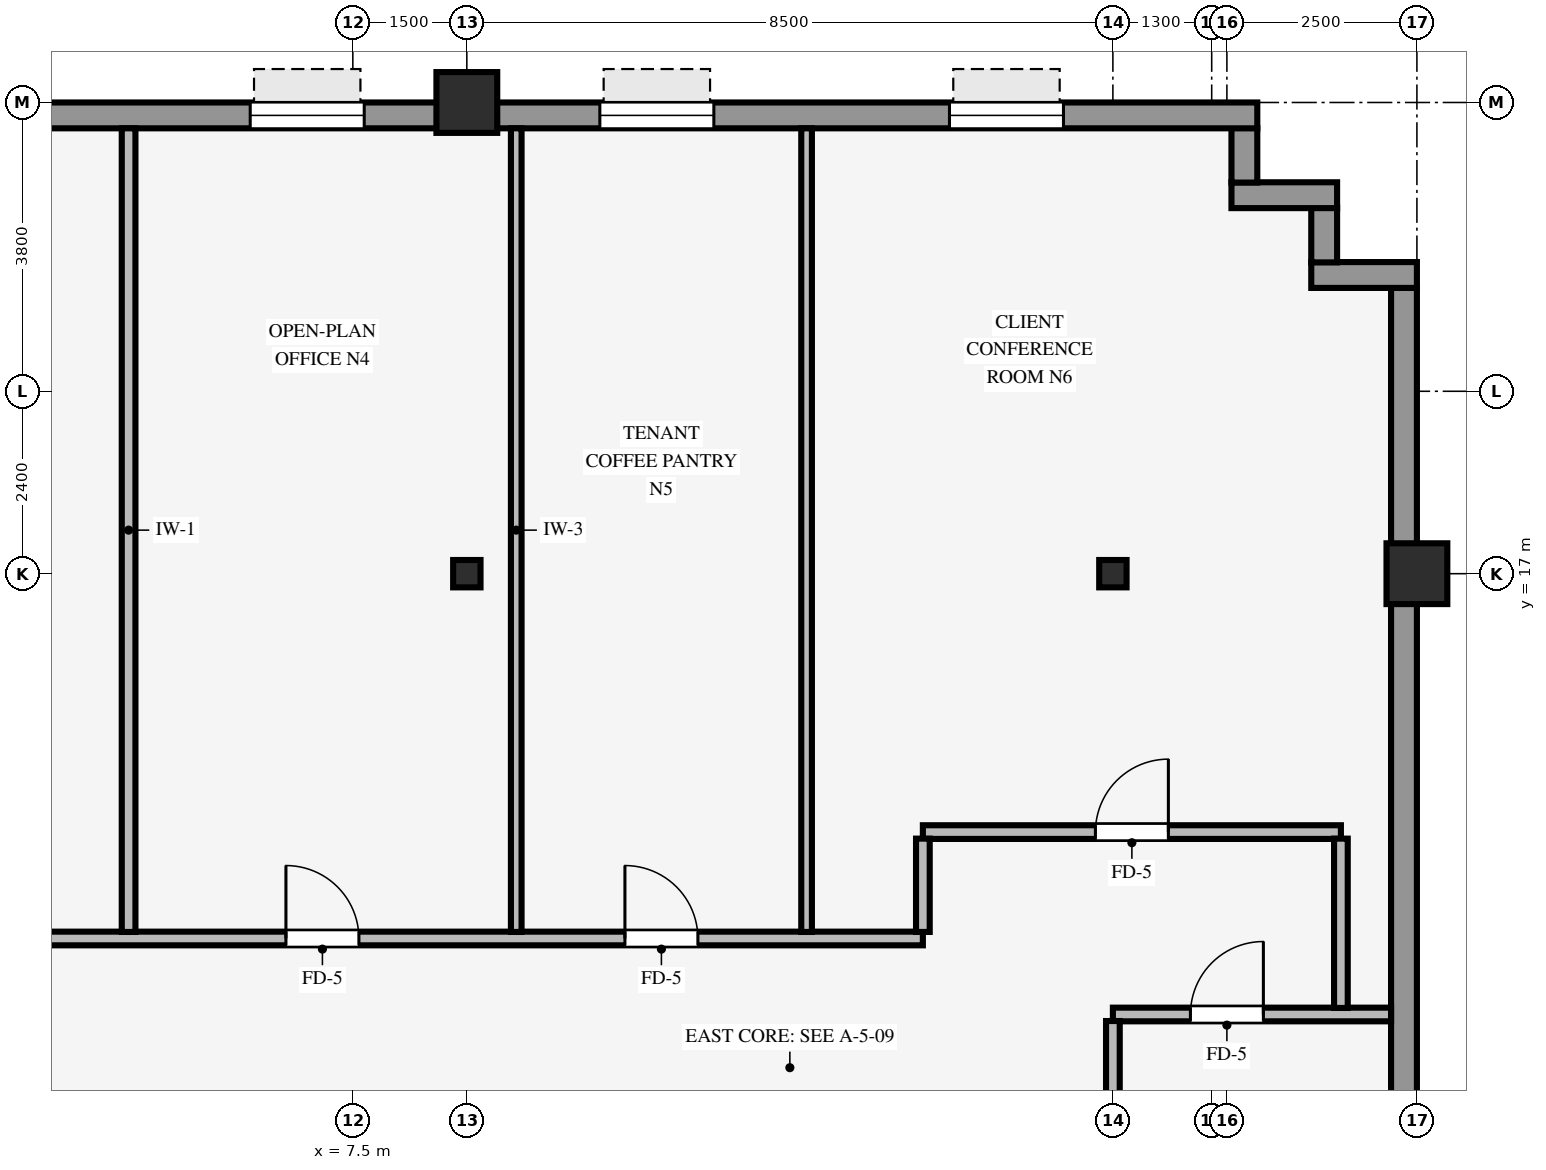
"""IFC4 building model, lengths in metres.
Left out: names, types, materials, properties, quantities, classifications, styles, units other than length and angle.
Written with IfcOpenShell. Run it as: python <this file> out.ifc"""

import sys

from ifc_helpers import new_model, si_unit, direction, frame, frame_2d, origin, origin_2d, place, context, subcontext, project, spatial, rectangle, hollow_rectangle, i_section, extrude, source, transform, mapped, element, fill, save


model = new_model("IFC4")
c1 = context("Model", 3, precision=1e-05, world=origin(), true_north=direction((0.0, 1.0)))
c2 = subcontext(c1, "Body", "Model", "MODEL_VIEW")
j1 = project(units=[si_unit("LENGTHUNIT", "METRE"), si_unit("PLANEANGLEUNIT", "RADIAN")], contexts=[c1])
p1 = place(None, origin())
s1 = spatial("IfcSite", under=j1, at=p1, CompositionType="ELEMENT")
p2 = place(p1, origin())
s2 = spatial("IfcBuilding", under=s1, at=p2, CompositionType="ELEMENT")
p3 = place(p2, frame((0.0, 0.0, 82.35)))
s3 = spatial("IfcBuildingStorey", under=s2, at=p3, CompositionType="ELEMENT", Elevation=82.35)
for number, where, z_axis, x_axis in (
    (1, (21.5, 17.0, 0.0), (0.0, 0.0, 1.0), (1.0, 0.0, 0.0)),
    (2, (9.0, 23.2, 0.0), (0.0, 0.0, 1.0), (1.0, 0.0, 0.0)),
):
    element("IfcColumn", number, at=place(p3, frame(where, z_axis=z_axis, x_axis=x_axis)), inside=s3, PredefinedType="COLUMN", context=c2, shape_type="SweptSolid", body=[
        extrude(hollow_rectangle(XDim=0.8, YDim=0.8, WallThickness=0.055, InnerFilletRadius=0.055, OuterFilletRadius=0.11, at=origin_2d()), origin(), (0.0, 0.0, 1.0), 3.25),
    ])
for number, where, z_axis, x_axis in (
    (3, (9.0, 17.0, 0.0), (0.0, 0.0, 1.0), (1.0, 0.0, 0.0)),
    (4, (17.5, 17.0, 0.0), (0.0, 0.0, 1.0), (1.0, 0.0, 0.0)),
):
    element("IfcColumn", number, at=place(p3, frame(where, z_axis=z_axis, x_axis=x_axis)), inside=s3, PredefinedType="COLUMN", context=c2, shape_type="SweptSolid", body=[
        extrude(i_section(OverallWidth=0.36, OverallDepth=0.36, WebThickness=0.021, FlangeThickness=0.021, FilletRadius=0.018, at=origin_2d()), origin(), (0.0, 0.0, 1.0), 3.25),
    ])
p4 = place(p3, frame((21.33, -20.764, 0.0), z_axis=(0.0, 0.0, 1.0), x_axis=(0.0, 1.0, 0.0)))
e5 = element("IfcWall", 5, at=p4, inside=s3, PredefinedType="STANDARD", context=c2, shape_type="SweptSolid", body=[
    extrude(rectangle(XDim=41.528, YDim=0.34, at=frame_2d((20.764, 0.0))), origin(), (0.0, 0.0, 1.0), 3.24),
])
p5 = place(p4, frame((15.793, 0.0, 0.8)))
e6 = element("IfcOpeningElement", 6, at=p5, cuts=e5, PredefinedType="OPENING", context=c2, shape_type="SweptSolid", body=[
    extrude(rectangle(XDim=2.3, YDim=1.62, at=frame_2d((1.15, 0.81))), frame((0.0, 0.18, 0.0), z_axis=(0.0, -1.0, 0.0), x_axis=(1.0, 0.0, 0.0)), (0.0, 0.0, 1.0), 0.36),
])
p6 = place(p4, frame((22.084, 0.0, 0.8)))
e7 = element("IfcOpeningElement", 7, at=p6, cuts=e5, PredefinedType="OPENING", context=c2, shape_type="SweptSolid", body=[
    extrude(rectangle(XDim=2.3, YDim=1.62, at=frame_2d((1.15, 0.81))), frame((0.0, 0.18, 0.0), z_axis=(0.0, -1.0, 0.0), x_axis=(1.0, 0.0, 0.0)), (0.0, 0.0, 1.0), 0.36),
])
p7 = place(p3, frame((20.11, 20.93, 0.0), z_axis=(0.0, 0.0, 1.0), x_axis=(1.0, 0.0, 0.0)))
e8 = element("IfcWall", 8, at=p7, inside=s3, PredefinedType="STANDARD", context=c2, shape_type="SweptSolid", body=[
    extrude(rectangle(XDim=1.39, YDim=0.34, at=frame_2d((0.695, 0.0))), origin(), (0.0, 0.0, 1.0), 3.24),
])
p8 = place(p3, frame((20.28, 21.096, 0.0), z_axis=(0.0, 0.0, 1.0), x_axis=(0.0, 1.0, 0.0)))
e9 = element("IfcWall", 9, at=p8, inside=s3, PredefinedType="STANDARD", context=c2, shape_type="SweptSolid", body=[
    extrude(rectangle(XDim=0.718, YDim=0.34, at=frame_2d((0.359, 0.0))), origin(), (0.0, 0.0, 1.0), 3.24),
])
p9 = place(p3, frame((19.06, 21.98, 0.0), z_axis=(0.0, 0.0, 1.0), x_axis=(1.0, 0.0, 0.0)))
e10 = element("IfcWall", 10, at=p9, inside=s3, PredefinedType="STANDARD", context=c2, shape_type="SweptSolid", body=[
    extrude(rectangle(XDim=1.39, YDim=0.34, at=frame_2d((0.695, 0.0))), origin(), (0.0, 0.0, 1.0), 3.24),
])
p10 = place(p3, frame((19.23, 22.146, 0.0), z_axis=(0.0, 0.0, 1.0), x_axis=(0.0, 1.0, 0.0)))
e11 = element("IfcWall", 11, at=p10, inside=s3, PredefinedType="STANDARD", context=c2, shape_type="SweptSolid", body=[
    extrude(rectangle(XDim=0.718, YDim=0.34, at=frame_2d((0.359, 0.0))), origin(), (0.0, 0.0, 1.0), 3.24),
])
p11 = place(p3, frame((-19.4, 23.03, 0.0), z_axis=(0.0, 0.0, 1.0), x_axis=(1.0, 0.0, 0.0)))
e12 = element("IfcWall", 12, at=p11, inside=s3, PredefinedType="STANDARD", context=c2, shape_type="SweptSolid", body=[
    extrude(rectangle(XDim=38.8, YDim=0.34, at=frame_2d((19.4, 0.0))), origin(), (0.0, 0.0, 1.0), 2.585),
])
p12 = place(p11, frame((2.55, 0.0, 0.8)))
e13 = element("IfcOpeningElement", 13, at=p12, cuts=e12, PredefinedType="OPENING", context=c2, shape_type="SweptSolid", body=[
    extrude(rectangle(XDim=1.5, YDim=1.6, at=frame_2d((0.75, 0.8))), frame((0.0, 0.18, 0.0), z_axis=(0.0, -1.0, 0.0), x_axis=(1.0, 0.0, 0.0)), (0.0, 0.0, 1.0), 0.36),
])
p13 = place(p11, frame((7.15, 0.0, 0.8)))
e14 = element("IfcOpeningElement", 14, at=p13, cuts=e12, PredefinedType="OPENING", context=c2, shape_type="SweptSolid", body=[
    extrude(rectangle(XDim=1.5, YDim=1.6, at=frame_2d((0.75, 0.8))), frame((0.0, 0.18, 0.0), z_axis=(0.0, -1.0, 0.0), x_axis=(1.0, 0.0, 0.0)), (0.0, 0.0, 1.0), 0.36),
])
p14 = place(p11, frame((12.2, 0.0, 0.8)))
e15 = element("IfcOpeningElement", 15, at=p14, cuts=e12, PredefinedType="OPENING", context=c2, shape_type="SweptSolid", body=[
    extrude(rectangle(XDim=1.5, YDim=1.6, at=frame_2d((0.75, 0.8))), frame((0.0, 0.18, 0.0), z_axis=(0.0, -1.0, 0.0), x_axis=(1.0, 0.0, 0.0)), (0.0, 0.0, 1.0), 0.36),
])
p15 = place(p11, frame((16.35, 0.0, 0.8)))
e16 = element("IfcOpeningElement", 16, at=p15, cuts=e12, PredefinedType="OPENING", context=c2, shape_type="SweptSolid", body=[
    extrude(rectangle(XDim=1.5, YDim=1.6, at=frame_2d((0.75, 0.8))), frame((0.0, 0.18, 0.0), z_axis=(0.0, -1.0, 0.0), x_axis=(1.0, 0.0, 0.0)), (0.0, 0.0, 1.0), 0.36),
])
p16 = place(p11, frame((20.95, 0.0, 0.8)))
e17 = element("IfcOpeningElement", 17, at=p16, cuts=e12, PredefinedType="OPENING", context=c2, shape_type="SweptSolid", body=[
    extrude(rectangle(XDim=1.5, YDim=1.6, at=frame_2d((0.75, 0.8))), frame((0.0, 0.18, 0.0), z_axis=(0.0, -1.0, 0.0), x_axis=(1.0, 0.0, 0.0)), (0.0, 0.0, 1.0), 0.36),
])
p17 = place(p11, frame((25.55, 0.0, 0.8)))
e18 = element("IfcOpeningElement", 18, at=p17, cuts=e12, PredefinedType="OPENING", context=c2, shape_type="SweptSolid", body=[
    extrude(rectangle(XDim=1.5, YDim=1.6, at=frame_2d((0.75, 0.8))), frame((0.0, 0.18, 0.0), z_axis=(0.0, -1.0, 0.0), x_axis=(1.0, 0.0, 0.0)), (0.0, 0.0, 1.0), 0.36),
])
p18 = place(p11, frame((30.15, 0.0, 0.8)))
e19 = element("IfcOpeningElement", 19, at=p18, cuts=e12, PredefinedType="OPENING", context=c2, shape_type="SweptSolid", body=[
    extrude(rectangle(XDim=1.5, YDim=1.6, at=frame_2d((0.75, 0.8))), frame((0.0, 0.18, 0.0), z_axis=(0.0, -1.0, 0.0), x_axis=(1.0, 0.0, 0.0)), (0.0, 0.0, 1.0), 0.36),
])
p19 = place(p11, frame((34.75, 0.0, 0.8)))
e20 = element("IfcOpeningElement", 20, at=p19, cuts=e12, PredefinedType="OPENING", context=c2, shape_type="SweptSolid", body=[
    extrude(rectangle(XDim=1.5, YDim=1.6, at=frame_2d((0.75, 0.8))), frame((0.0, 0.18, 0.0), z_axis=(0.0, -1.0, 0.0), x_axis=(1.0, 0.0, 0.0)), (0.0, 0.0, 1.0), 0.36),
])
p20 = place(p3, frame((17.5, 11.2, 0.0), z_axis=(0.0, 0.0, 1.0), x_axis=(1.0, 0.0, 0.0)))
e21 = element("IfcWall", 21, at=p20, inside=s3, PredefinedType="PARTITIONING", context=c2, shape_type="SweptSolid", body=[
    extrude(rectangle(XDim=3.66, YDim=0.18, at=frame_2d((1.83, 0.0))), origin(), (0.0, 0.0, 1.0), 3.24),
])
p21 = place(p20, frame((1.02, 0.0, 0.0)))
e22 = element("IfcOpeningElement", 22, at=p21, cuts=e21, PredefinedType="OPENING", context=c2, shape_type="SweptSolid", body=[
    extrude(rectangle(XDim=0.96, YDim=2.1, at=frame_2d((0.48, 1.05))), frame((0.0, 0.1, 0.0), z_axis=(0.0, -1.0, 0.0), x_axis=(1.0, 0.0, 0.0)), (0.0, 0.0, 1.0), 0.2),
])
p22 = place(p3, frame((-15.0, 12.2, 0.0), z_axis=(0.0, 0.0, 1.0), x_axis=(1.0, 0.0, 0.0)))
e23 = element("IfcWall", 23, at=p22, inside=s3, PredefinedType="PARTITIONING", context=c2, shape_type="SweptSolid", body=[
    extrude(rectangle(XDim=30.0, YDim=0.18, at=frame_2d((15.0, 0.0))), origin(), (0.0, 0.0, 1.0), 3.24),
])
p23 = place(p22, frame((3.1, 0.0, 0.0)))
e24 = element("IfcOpeningElement", 24, at=p23, cuts=e23, PredefinedType="OPENING", context=c2, shape_type="SweptSolid", body=[
    extrude(rectangle(XDim=0.96, YDim=2.1, at=frame_2d((0.48, 1.05))), frame((0.0, 0.1, 0.0), z_axis=(0.0, -1.0, 0.0), x_axis=(1.0, 0.0, 0.0)), (0.0, 0.0, 1.0), 0.2),
])
p24 = place(p22, frame((16.395, 0.0, 0.0)))
e25 = element("IfcOpeningElement", 25, at=p24, cuts=e23, PredefinedType="OPENING", context=c2, shape_type="SweptSolid", body=[
    extrude(rectangle(XDim=0.96, YDim=2.1, at=frame_2d((0.48, 1.05))), frame((0.0, 0.1, 0.0), z_axis=(0.0, -1.0, 0.0), x_axis=(1.0, 0.0, 0.0)), (0.0, 0.0, 1.0), 0.2),
])
p25 = place(p22, frame((21.62, 0.0, 0.0)))
e26 = element("IfcOpeningElement", 26, at=p25, cuts=e23, PredefinedType="OPENING", context=c2, shape_type="SweptSolid", body=[
    extrude(rectangle(XDim=0.96, YDim=2.1, at=frame_2d((0.48, 1.05))), frame((0.0, 0.1, 0.0), z_axis=(0.0, -1.0, 0.0), x_axis=(1.0, 0.0, 0.0)), (0.0, 0.0, 1.0), 0.2),
])
p26 = place(p22, frame((9.0, 0.0, 0.0)))
e27 = element("IfcOpeningElement", 27, at=p26, cuts=e23, PredefinedType="OPENING", context=c2, shape_type="SweptSolid", body=[
    extrude(rectangle(XDim=0.96, YDim=2.1, at=frame_2d((0.48, 1.05))), frame((0.0, 0.1, 0.0), z_axis=(0.0, -1.0, 0.0), x_axis=(1.0, 0.0, 0.0)), (0.0, 0.0, 1.0), 0.2),
])
p27 = place(p22, frame((26.08, 0.0, 0.0)))
e28 = element("IfcOpeningElement", 28, at=p27, cuts=e23, PredefinedType="OPENING", context=c2, shape_type="SweptSolid", body=[
    extrude(rectangle(XDim=0.96, YDim=2.1, at=frame_2d((0.48, 1.05))), frame((0.0, 0.1, 0.0), z_axis=(0.0, -1.0, 0.0), x_axis=(1.0, 0.0, 0.0)), (0.0, 0.0, 1.0), 0.2),
])
p28 = place(p3, frame((15.0, 13.6, 0.0), z_axis=(0.0, 0.0, 1.0), x_axis=(1.0, 0.0, 0.0)))
e29 = element("IfcWall", 29, at=p28, inside=s3, PredefinedType="PARTITIONING", context=c2, shape_type="SweptSolid", body=[
    extrude(rectangle(XDim=5.5, YDim=0.18, at=frame_2d((2.75, 0.0))), origin(), (0.0, 0.0, 1.0), 2.878),
])
p29 = place(p28, frame((2.27, 0.0, 0.0)))
e30 = element("IfcOpeningElement", 30, at=p29, cuts=e29, PredefinedType="OPENING", context=c2, shape_type="SweptSolid", body=[
    extrude(rectangle(XDim=0.96, YDim=2.1, at=frame_2d((0.48, 1.05))), frame((0.0, 0.1, 0.0), z_axis=(0.0, -1.0, 0.0), x_axis=(1.0, 0.0, 0.0)), (0.0, 0.0, 1.0), 0.2),
])
p30 = place(p3, frame((4.55, 12.286, 0.0), z_axis=(0.0, 0.0, 1.0), x_axis=(0.0, 1.0, 0.0)))
e31 = element("IfcWall", 31, at=p30, inside=s3, PredefinedType="PARTITIONING", context=c2, shape_type="SweptSolid", body=[
    extrude(rectangle(XDim=10.574, YDim=0.18, at=frame_2d((5.287, 0.0))), origin(), (0.0, 0.0, 1.0), 3.24),
])
for number, where, z_axis, x_axis in (
    (32, (9.65, 12.286, 0.0), (0.0, 0.0, 1.0), (0.0, 1.0, 0.0)),
    (33, (13.47, 12.286, 0.0), (0.0, 0.0, 1.0), (0.0, 1.0, 0.0)),
):
    element("IfcWall", number, at=place(p3, frame(where, z_axis=z_axis, x_axis=x_axis)), inside=s3, PredefinedType="PARTITIONING", context=c2, shape_type="SweptSolid", body=[
        extrude(rectangle(XDim=10.574, YDim=0.14, at=frame_2d((5.287, 0.0))), origin(), (0.0, 0.0, 1.0), 3.24),
    ])
p31 = place(p3, frame((15.0, 12.286, 0.0), z_axis=(0.0, 0.0, 1.0), x_axis=(0.0, 1.0, 0.0)))
e34 = element("IfcWall", 34, at=p31, inside=s3, PredefinedType="PARTITIONING", context=c2, shape_type="SweptSolid", body=[
    extrude(rectangle(XDim=1.228, YDim=0.18, at=frame_2d((0.614, 0.0))), origin(), (0.0, 0.0, 1.0), 3.24),
])
p32 = place(p3, frame((17.5, 10.146, 0.0), z_axis=(0.0, 0.0, 1.0), x_axis=(0.0, 1.0, 0.0)))
e35 = element("IfcWall", 35, at=p32, inside=s3, PredefinedType="PARTITIONING", context=c2, shape_type="SweptSolid", body=[
    extrude(rectangle(XDim=0.968, YDim=0.18, at=frame_2d((0.484, 0.0))), origin(), (0.0, 0.0, 1.0), 2.618),
])
p33 = place(p3, frame((20.5, 11.286, 0.0), z_axis=(0.0, 0.0, 1.0), x_axis=(0.0, 1.0, 0.0)))
e36 = element("IfcWall", 36, at=p33, inside=s3, PredefinedType="PARTITIONING", context=c2, shape_type="SweptSolid", body=[
    extrude(rectangle(XDim=2.228, YDim=0.18, at=frame_2d((1.114, 0.0))), origin(), (0.0, 0.0, 1.0), 3.24),
])
m1 = source(origin(), c2, "Body", "SweptSolid", [
    extrude(rectangle(XDim=1.5, YDim=1.6, at=frame_2d((0.75, 0.8))), frame((0.0, 0.03, 0.0), z_axis=(0.0, -1.0, 0.0), x_axis=(1.0, 0.0, 0.0)), (0.0, 0.0, 1.0), 0.06),
])
p34 = place(p17, origin())
e37 = element("IfcWindow", 37, at=p34, inside=s3, PartitioningType="SINGLE_PANEL", PredefinedType="WINDOW", context=c2, shape_type="MappedRepresentation", body=[
    mapped(m1, transform((0.0, 0.0, 0.0), scale=1.0)),
])
fill(e18, e37)
p35 = place(p18, origin())
e38 = element("IfcWindow", 38, at=p35, inside=s3, PartitioningType="SINGLE_PANEL", PredefinedType="WINDOW", context=c2, shape_type="MappedRepresentation", body=[
    mapped(m1, transform((0.0, 0.0, 0.0), scale=1.0)),
])
fill(e19, e38)
p36 = place(p19, origin())
e39 = element("IfcWindow", 39, at=p36, inside=s3, PartitioningType="SINGLE_PANEL", PredefinedType="WINDOW", context=c2, shape_type="MappedRepresentation", body=[
    mapped(m1, transform((0.0, 0.0, 0.0), scale=1.0)),
])
fill(e20, e39)
m2 = source(origin(), c2, "Body", "SweptSolid", [
    extrude(rectangle(XDim=0.96, YDim=2.1, at=frame_2d((0.48, 1.05))), frame((0.0, 0.025, 0.0), z_axis=(0.0, -1.0, 0.0), x_axis=(1.0, 0.0, 0.0)), (0.0, 0.0, 1.0), 0.05),
])
p37 = place(p29, origin())
e40 = element("IfcDoor", 40, at=p37, inside=s3, OperationType="SINGLE_SWING_RIGHT", PredefinedType="DOOR", context=c2, shape_type="MappedRepresentation", body=[
    mapped(m2, transform((0.0, 0.0, 0.0), scale=1.0)),
])
fill(e30, e40)
p38 = place(p25, origin())
e41 = element("IfcDoor", 41, at=p38, inside=s3, OperationType="SINGLE_SWING_LEFT", PredefinedType="DOOR", context=c2, shape_type="MappedRepresentation", body=[
    mapped(m2, transform((0.0, 0.0, 0.0), scale=1.0)),
])
fill(e26, e41)
p39 = place(p27, origin())
e42 = element("IfcDoor", 42, at=p39, inside=s3, OperationType="SINGLE_SWING_LEFT", PredefinedType="DOOR", context=c2, shape_type="MappedRepresentation", body=[
    mapped(m2, transform((0.0, 0.0, 0.0), scale=1.0)),
])
fill(e28, e42)
p40 = place(p21, origin())
e43 = element("IfcDoor", 43, at=p40, inside=s3, OperationType="SINGLE_SWING_RIGHT", PredefinedType="DOOR", context=c2, shape_type="MappedRepresentation", body=[
    mapped(m2, transform((0.0, 0.0, 0.0), scale=1.0)),
])
fill(e22, e43)
save(model, sys.argv[1])
